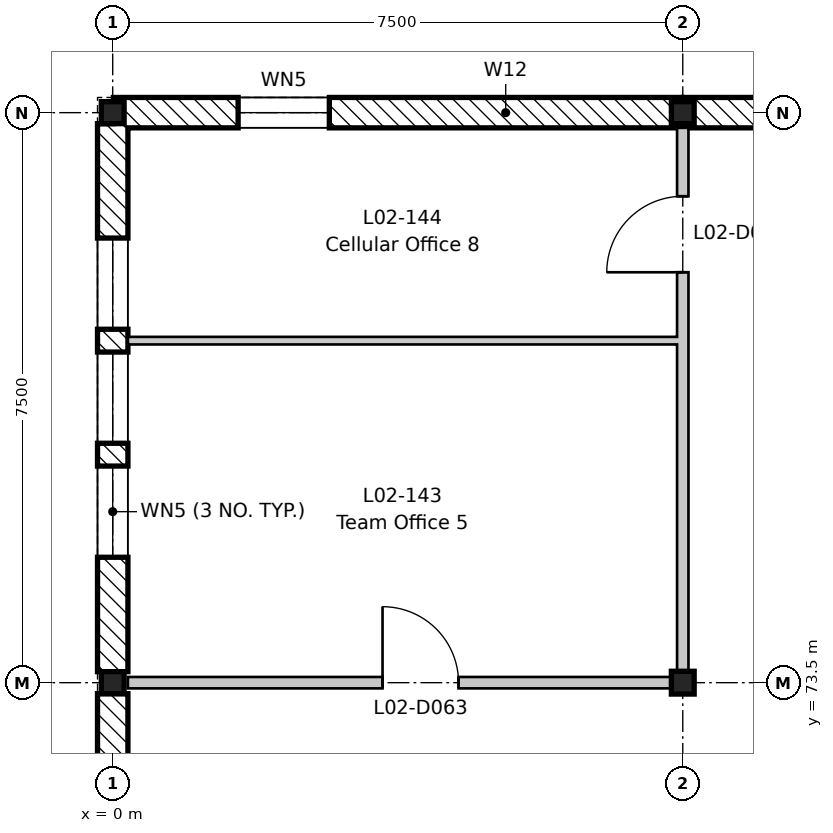
"""IFC4 building model, lengths in metres.
Left out: names, types, materials, properties, quantities, classifications, styles, units other than length and angle.
Written with IfcOpenShell. Run it as: python <this file> out.ifc"""

import sys

from ifc_helpers import new_model, si_unit, direction, frame, frame_2d, origin, origin_2d, place, context, subcontext, project, spatial, rectangle, i_section, extrude, element, fill, save


model = new_model("IFC4")
c1 = context("Model", 3, precision=1e-05, world=origin(), true_north=direction((0.0, 1.0)))
c2 = subcontext(c1, "Body", "Model", "MODEL_VIEW")
j1 = project(units=[si_unit("LENGTHUNIT", "METRE"), si_unit("PLANEANGLEUNIT", "RADIAN")], contexts=[c1])
p1 = place(None, origin())
s1 = spatial("IfcSite", under=j1, at=p1, CompositionType="ELEMENT")
p2 = place(p1, origin())
s2 = spatial("IfcBuilding", under=s1, at=p2, CompositionType="ELEMENT")
p3 = place(p2, frame((0.0, 0.0, 9.9)))
s3 = spatial("IfcBuildingStorey", under=s2, at=p3, CompositionType="ELEMENT", Elevation=9.9)
for number, where, z_axis, x_axis in (
    (1, (0.0, 73.5, -0.2), (0.0, 0.0, 1.0), (1.0, 0.0, 0.0)),
    (2, (0.0, 81.0, -0.2), (0.0, 0.0, 1.0), (1.0, 0.0, 0.0)),
):
    element("IfcColumn", number, at=place(p3, frame(where, z_axis=z_axis, x_axis=x_axis)), inside=s3, PredefinedType="COLUMN", context=c2, shape_type="SweptSolid", body=[
        extrude(i_section(OverallWidth=0.3, OverallDepth=0.29, WebThickness=0.009, FlangeThickness=0.014, FilletRadius=0.027, at=origin_2d()), origin(), (0.0, 0.0, 1.0), 4.5),
    ])
p4 = place(p3, frame((7.5, 73.5, -0.2), z_axis=(0.0, 0.0, 1.0), x_axis=(1.0, 0.0, 0.0)))
e3 = element("IfcColumn", 3, at=p4, inside=s3, PredefinedType="COLUMN", context=c2, shape_type="SweptSolid", body=[
    extrude(i_section(OverallWidth=0.3, OverallDepth=0.3, WebThickness=0.011, FlangeThickness=0.019, FilletRadius=0.027, at=origin_2d()), origin(), (0.0, 0.0, 1.0), 4.5),
])
p5 = place(p3, frame((7.5, 81.0, -0.2), z_axis=(0.0, 0.0, 1.0), x_axis=(1.0, 0.0, 0.0)))
e4 = element("IfcColumn", 4, at=p5, inside=s3, PredefinedType="COLUMN", context=c2, shape_type="SweptSolid", body=[
    extrude(i_section(OverallWidth=0.3, OverallDepth=0.29, WebThickness=0.009, FlangeThickness=0.014, FilletRadius=0.027, at=origin_2d()), origin(), (0.0, 0.0, 1.0), 4.5),
])
p6 = place(p3, frame((0.0, 70.645, 0.0), z_axis=(0.0, 0.0, 1.0), x_axis=(0.0, 1.0, 0.0)))
e5 = element("IfcWall", 5, at=p6, inside=s3, PredefinedType="STANDARD", context=c2, shape_type="SweptSolid", body=[
    extrude(rectangle(XDim=2.71, YDim=0.4, at=frame_2d((1.355, 0.0))), origin(), (0.0, 0.0, 1.0), 4.03),
])
p7 = place(p3, frame((0.0, 73.645, 0.0), z_axis=(0.0, 0.0, 1.0), x_axis=(0.0, 1.0, 0.0)))
e6 = element("IfcWall", 6, at=p7, inside=s3, PredefinedType="STANDARD", context=c2, shape_type="SweptSolid", body=[
    extrude(rectangle(XDim=7.21, YDim=0.4, at=frame_2d((3.605, 0.0))), origin(), (0.0, 0.0, 1.0), 3.9),
])
p8 = place(p7, frame((1.505, 0.0, 0.6)))
e7 = element("IfcOpeningElement", 7, at=p8, cuts=e6, PredefinedType="OPENING", context=c2, shape_type="SweptSolid", body=[
    extrude(rectangle(XDim=1.2, YDim=3.0, at=frame_2d((0.6, 1.5))), frame((0.0, 0.21, 0.0), z_axis=(0.0, -1.0, 0.0), x_axis=(1.0, 0.0, 0.0)), (0.0, 0.0, 1.0), 0.42),
])
p9 = place(p7, frame((3.005, 0.0, 0.6)))
e8 = element("IfcOpeningElement", 8, at=p9, cuts=e6, PredefinedType="OPENING", context=c2, shape_type="SweptSolid", body=[
    extrude(rectangle(XDim=1.2, YDim=3.0, at=frame_2d((0.6, 1.5))), frame((0.0, 0.21, 0.0), z_axis=(0.0, -1.0, 0.0), x_axis=(1.0, 0.0, 0.0)), (0.0, 0.0, 1.0), 0.42),
])
p10 = place(p7, frame((4.505, 0.0, 0.6)))
e9 = element("IfcOpeningElement", 9, at=p10, cuts=e6, PredefinedType="OPENING", context=c2, shape_type="SweptSolid", body=[
    extrude(rectangle(XDim=1.2, YDim=3.0, at=frame_2d((0.6, 1.5))), frame((0.0, 0.21, 0.0), z_axis=(0.0, -1.0, 0.0), x_axis=(1.0, 0.0, 0.0)), (0.0, 0.0, 1.0), 0.42),
])
p11 = place(p3, frame((0.009, 81.0, 0.0), z_axis=(0.0, 0.0, 1.0), x_axis=(1.0, 0.0, 0.0)))
e10 = element("IfcWall", 10, at=p11, inside=s3, PredefinedType="STANDARD", context=c2, shape_type="SweptSolid", body=[
    extrude(rectangle(XDim=7.481, YDim=0.4, at=frame_2d((3.741, 0.0))), origin(), (0.0, 0.0, 1.0), 3.97),
])
p12 = place(p11, frame((1.641, 0.0, 0.6)))
e11 = element("IfcOpeningElement", 11, at=p12, cuts=e10, PredefinedType="OPENING", context=c2, shape_type="SweptSolid", body=[
    extrude(rectangle(XDim=1.2, YDim=3.0, at=frame_2d((0.6, 1.5))), frame((0.0, 0.21, 0.0), z_axis=(0.0, -1.0, 0.0), x_axis=(1.0, 0.0, 0.0)), (0.0, 0.0, 1.0), 0.42),
])
p13 = place(p3, frame((7.509, 81.0, 0.0), z_axis=(0.0, 0.0, 1.0), x_axis=(1.0, 0.0, 0.0)))
e12 = element("IfcWall", 12, at=p13, inside=s3, PredefinedType="STANDARD", context=c2, shape_type="SweptSolid", body=[
    extrude(rectangle(XDim=2.981, YDim=0.4, at=frame_2d((1.491, 0.0))), origin(), (0.0, 0.0, 1.0), 4.1),
])
p14 = place(p3, frame((7.5, 73.5, 0.0), z_axis=(0.0, 0.0, 1.0), x_axis=(0.0, 1.0, 0.0)))
e13 = element("IfcWall", 13, at=p14, inside=s3, PredefinedType="PARTITIONING", context=c2, shape_type="SweptSolid", body=[
    extrude(rectangle(XDim=7.3, YDim=0.15, at=frame_2d((3.65, 0.0))), origin(), (0.0, 0.0, 1.0), 3.78),
])
p15 = place(p14, frame((5.4, 0.0, 0.0)))
e14 = element("IfcOpeningElement", 14, at=p15, cuts=e13, PredefinedType="OPENING", context=c2, shape_type="SweptSolid", body=[
    extrude(rectangle(XDim=1.0, YDim=2.1, at=frame_2d((0.5, 1.05))), frame((0.0, 0.085, 0.0), z_axis=(0.0, -1.0, 0.0), x_axis=(1.0, 0.0, 0.0)), (0.0, 0.0, 1.0), 0.17),
])
p16 = place(p3, frame((0.2, 73.5, 0.0), z_axis=(0.0, 0.0, 1.0), x_axis=(1.0, 0.0, 0.0)))
e15 = element("IfcWall", 15, at=p16, inside=s3, PredefinedType="PARTITIONING", context=c2, shape_type="SweptSolid", body=[
    extrude(rectangle(XDim=7.225, YDim=0.15, at=frame_2d((3.613, 0.0))), origin(), (0.0, 0.0, 1.0), 3.95),
])
p17 = place(p16, frame((3.35, 0.0, 0.0)))
e16 = element("IfcOpeningElement", 16, at=p17, cuts=e15, PredefinedType="OPENING", context=c2, shape_type="SweptSolid", body=[
    extrude(rectangle(XDim=1.0, YDim=2.1, at=frame_2d((0.5, 1.05))), frame((0.0, 0.085, 0.0), z_axis=(0.0, -1.0, 0.0), x_axis=(1.0, 0.0, 0.0)), (0.0, 0.0, 1.0), 0.17),
])
p18 = place(p3, frame((0.2, 78.0, 0.0), z_axis=(0.0, 0.0, 1.0), x_axis=(1.0, 0.0, 0.0)))
e17 = element("IfcWall", 17, at=p18, inside=s3, PredefinedType="PARTITIONING", context=c2, shape_type="SweptSolid", body=[
    extrude(rectangle(XDim=7.225, YDim=0.1, at=frame_2d((3.613, 0.0))), origin(), (0.0, 0.0, 1.0), 4.3),
])
p19 = place(p8, origin())
e18 = element("IfcWindow", 18, at=p19, inside=s3, PartitioningType="SINGLE_PANEL", PredefinedType="WINDOW", context=c2, shape_type="SweptSolid", body=[
    extrude(rectangle(XDim=1.2, YDim=3.0, at=frame_2d((0.6, 1.5))), frame((0.0, 0.03, 0.0), z_axis=(0.0, -1.0, 0.0), x_axis=(1.0, 0.0, 0.0)), (0.0, 0.0, 1.0), 0.06),
])
fill(e7, e18)
p20 = place(p9, origin())
e19 = element("IfcWindow", 19, at=p20, inside=s3, PartitioningType="SINGLE_PANEL", PredefinedType="WINDOW", context=c2, shape_type="SweptSolid", body=[
    extrude(rectangle(XDim=1.2, YDim=3.0, at=frame_2d((0.6, 1.5))), frame((0.0, 0.03, 0.0), z_axis=(0.0, -1.0, 0.0), x_axis=(1.0, 0.0, 0.0)), (0.0, 0.0, 1.0), 0.06),
])
fill(e8, e19)
p21 = place(p10, origin())
e20 = element("IfcWindow", 20, at=p21, inside=s3, PartitioningType="SINGLE_PANEL", PredefinedType="WINDOW", context=c2, shape_type="SweptSolid", body=[
    extrude(rectangle(XDim=1.2, YDim=3.0, at=frame_2d((0.6, 1.5))), frame((0.0, 0.03, 0.0), z_axis=(0.0, -1.0, 0.0), x_axis=(1.0, 0.0, 0.0)), (0.0, 0.0, 1.0), 0.06),
])
fill(e9, e20)
p22 = place(p12, origin())
e21 = element("IfcWindow", 21, at=p22, inside=s3, PartitioningType="SINGLE_PANEL", PredefinedType="WINDOW", context=c2, shape_type="SweptSolid", body=[
    extrude(rectangle(XDim=1.2, YDim=3.0, at=frame_2d((0.6, 1.5))), frame((0.0, 0.03, 0.0), z_axis=(0.0, -1.0, 0.0), x_axis=(1.0, 0.0, 0.0)), (0.0, 0.0, 1.0), 0.06),
])
fill(e11, e21)
p23 = place(p17, origin())
e22 = element("IfcDoor", 22, at=p23, inside=s3, OperationType="SINGLE_SWING_LEFT", PredefinedType="DOOR", context=c2, shape_type="SweptSolid", body=[
    extrude(rectangle(XDim=1.0, YDim=2.1, at=frame_2d((0.5, 1.05))), frame((0.0, 0.025, 0.0), z_axis=(0.0, -1.0, 0.0), x_axis=(1.0, 0.0, 0.0)), (0.0, 0.0, 1.0), 0.05),
])
fill(e16, e22)
p24 = place(p15, origin())
e23 = element("IfcDoor", 23, at=p24, inside=s3, OperationType="SINGLE_SWING_LEFT", PredefinedType="DOOR", context=c2, shape_type="SweptSolid", body=[
    extrude(rectangle(XDim=1.0, YDim=2.1, at=frame_2d((0.5, 1.05))), frame((0.0, 0.025, 0.0), z_axis=(0.0, -1.0, 0.0), x_axis=(1.0, 0.0, 0.0)), (0.0, 0.0, 1.0), 0.05),
])
fill(e14, e23)
save(model, sys.argv[1])
